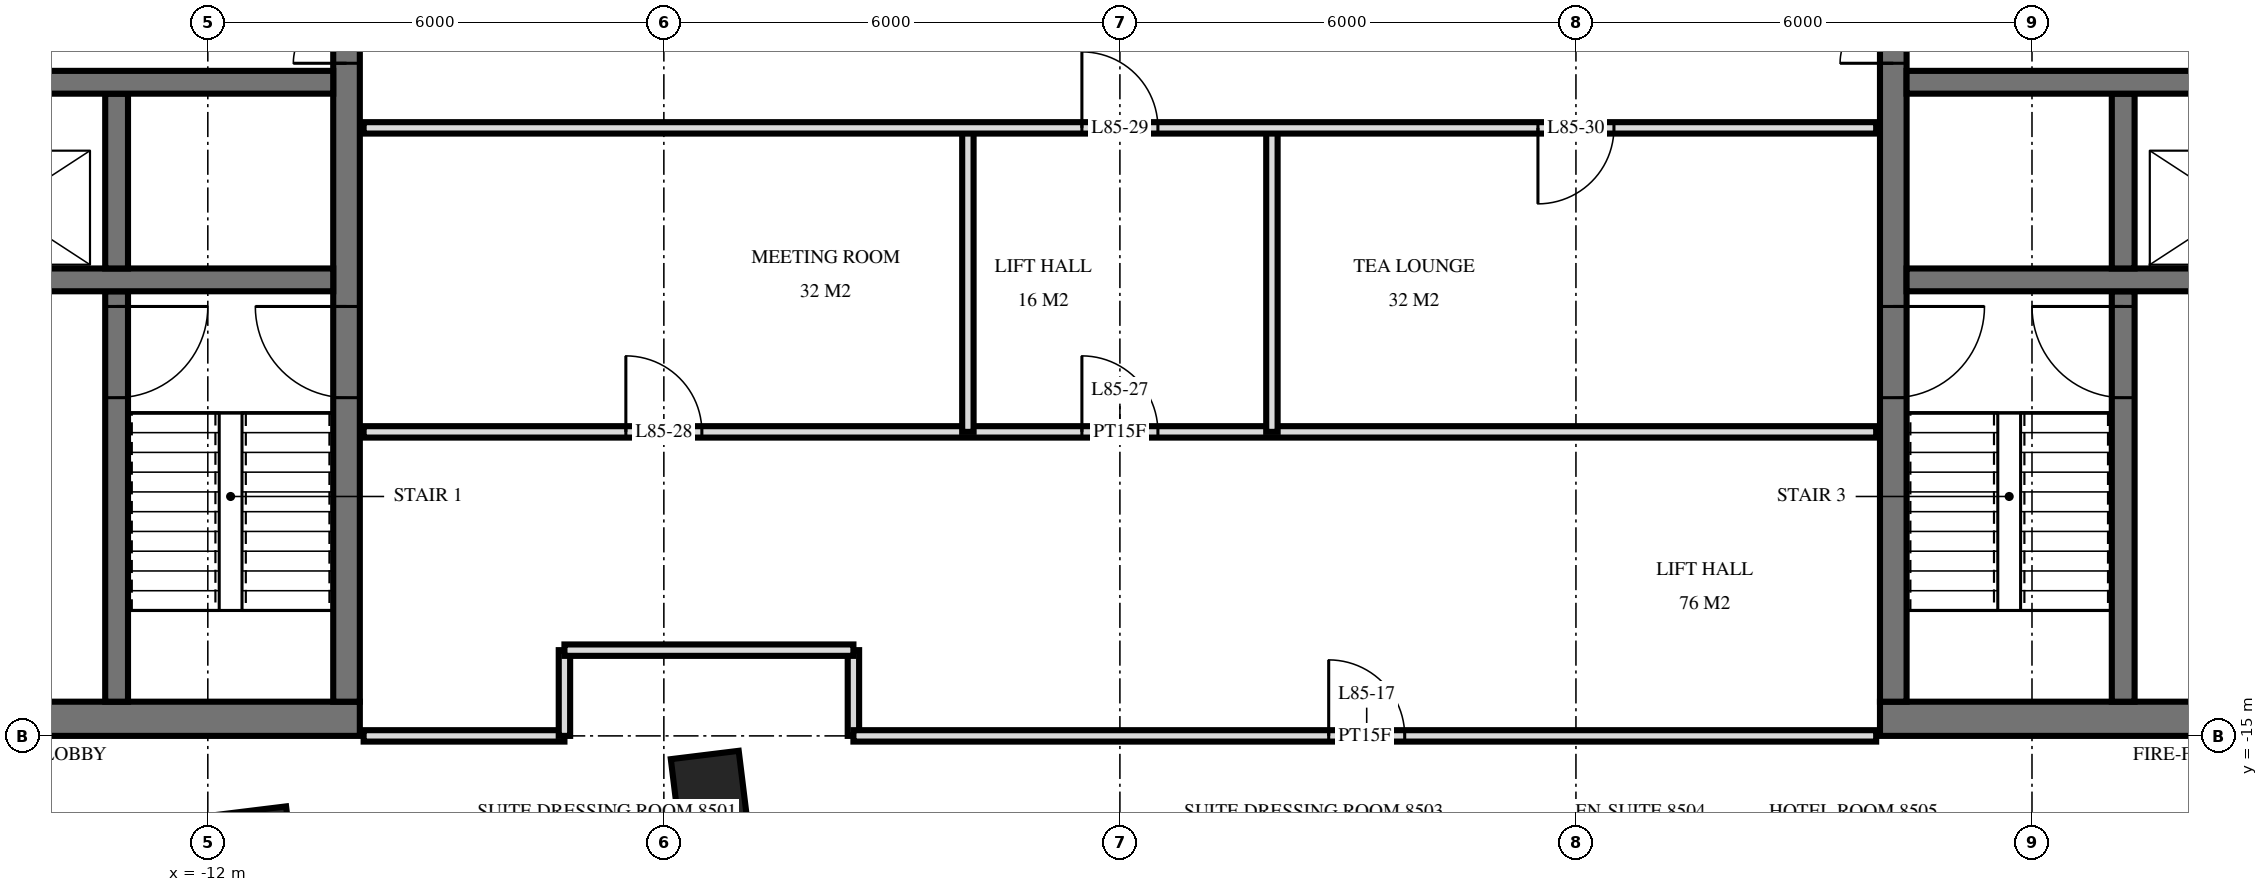
"""IFC4 building model, lengths in metres.
Left out: names, types, materials, properties, quantities, classifications, styles, units other than length and angle.
Written with IfcOpenShell. Run it as: python <this file> out.ifc"""

import sys

from ifc_helpers import new_model, si_unit, direction, frame, frame_2d, origin, origin_2d, place, context, subcontext, project, spatial, rectangle, extrude, element, fill, save


model = new_model("IFC4")
c1 = context("Model", 3, precision=1e-05, world=origin(), true_north=direction((0.0, 1.0)))
c2 = subcontext(c1, "Body", "Model", "MODEL_VIEW")
j1 = project(units=[si_unit("LENGTHUNIT", "METRE"), si_unit("PLANEANGLEUNIT", "RADIAN")], contexts=[c1])
p1 = place(None, origin())
s1 = spatial("IfcSite", under=j1, at=p1, CompositionType="ELEMENT")
p2 = place(p1, origin())
s2 = spatial("IfcBuilding", under=s1, at=p2, CompositionType="ELEMENT")
p3 = place(p2, frame((0.0, 0.0, 322.6)))
s3 = spatial("IfcBuildingStorey", under=s2, at=p3, CompositionType="ELEMENT", Elevation=322.6)
for number, where, z_axis, x_axis in (
    (1, (-11.362, -16.429, 0.0), (0.0, 0.0, 1.0), (0.993, 0.122, 0.0)),
    (2, (-5.407, -15.698, 0.0), (0.0, 0.0, 1.0), (0.993, 0.122, 0.0)),
):
    element("IfcColumn", number, at=place(p3, frame(where, z_axis=z_axis, x_axis=x_axis)), inside=s3, PredefinedType="COLUMN", context=c2, shape_type="SweptSolid", body=[
        extrude(rectangle(XDim=0.9, YDim=0.9, at=origin_2d()), origin(), (0.0, 0.0, 1.0), 4.0),
    ])
p4 = place(p3, frame((-19.5, -14.775, 0.0), z_axis=(0.0, 0.0, 1.0), x_axis=(1.0, 0.0, 0.0)))
e3 = element("IfcWall", 3, at=p4, inside=s3, PredefinedType="SHEAR", context=c2, shape_type="SweptSolid", body=[
    extrude(rectangle(XDim=9.5, YDim=0.45, at=frame_2d((4.75, 0.0))), origin(), (0.0, 0.0, 1.0), 4.0),
])
p5 = place(p4, frame((1.2, 0.0, 0.0)))
e4 = element("IfcOpeningElement", 4, at=p5, cuts=e3, PredefinedType="OPENING", context=c2, shape_type="SweptSolid", body=[
    extrude(rectangle(XDim=1.2, YDim=2.1, at=frame_2d((0.6, 1.05))), frame((0.0, 0.235, 0.0), z_axis=(0.0, -1.0, 0.0), x_axis=(1.0, 0.0, 0.0)), (0.0, 0.0, 1.0), 0.47),
])
p6 = place(p4, frame((4.25, 0.0, 0.0)))
e5 = element("IfcOpeningElement", 5, at=p6, cuts=e3, PredefinedType="OPENING", context=c2, shape_type="SweptSolid", body=[
    extrude(rectangle(XDim=1.1, YDim=2.1, at=frame_2d((0.55, 1.05))), frame((0.0, 0.235, 0.0), z_axis=(0.0, -1.0, 0.0), x_axis=(1.0, 0.0, 0.0)), (0.0, 0.0, 1.0), 0.47),
])
p7 = place(p3, frame((-10.175, -14.55, 0.0), z_axis=(0.0, 0.0, 1.0), x_axis=(0.0, 1.0, 0.0)))
e6 = element("IfcWall", 6, at=p7, inside=s3, PredefinedType="SHEAR", context=c2, shape_type="SweptSolid", body=[
    extrude(rectangle(XDim=14.1, YDim=0.35, at=frame_2d((7.05, 0.0))), origin(), (0.0, 0.0, 1.0), 4.0),
])
p8 = place(p7, frame((8.4, 0.0, 0.0)))
e7 = element("IfcOpeningElement", 7, at=p8, cuts=e6, PredefinedType="OPENING", context=c2, shape_type="SweptSolid", body=[
    extrude(rectangle(XDim=1.4, YDim=2.4, at=frame_2d((0.7, 1.2))), frame((0.0, 0.185, 0.0), z_axis=(0.0, -1.0, 0.0), x_axis=(1.0, 0.0, 0.0)), (0.0, 0.0, 1.0), 0.37),
])
p9 = place(p7, frame((10.0, 0.0, 0.0)))
e8 = element("IfcOpeningElement", 8, at=p9, cuts=e6, PredefinedType="OPENING", context=c2, shape_type="SweptSolid", body=[
    extrude(rectangle(XDim=1.4, YDim=2.4, at=frame_2d((0.7, 1.2))), frame((0.0, 0.185, 0.0), z_axis=(0.0, -1.0, 0.0), x_axis=(1.0, 0.0, 0.0)), (0.0, 0.0, 1.0), 0.37),
])
p10 = place(p7, frame((4.0, 0.0, 0.0)))
e9 = element("IfcOpeningElement", 9, at=p10, cuts=e6, PredefinedType="OPENING", context=c2, shape_type="SweptSolid", body=[
    extrude(rectangle(XDim=1.2, YDim=2.1, at=frame_2d((0.6, 1.05))), frame((0.0, 0.185, 0.0), z_axis=(0.0, -1.0, 0.0), x_axis=(1.0, 0.0, 0.0)), (0.0, 0.0, 1.0), 0.37),
])
p11 = place(p3, frame((-19.05, -6.4, 0.0), z_axis=(0.0, 0.0, 1.0), x_axis=(1.0, 0.0, 0.0)))
e10 = element("IfcWall", 10, at=p11, inside=s3, PredefinedType="SHEAR", context=c2, shape_type="SweptSolid", body=[
    extrude(rectangle(XDim=8.7, YDim=0.3, at=frame_2d((4.35, 0.0))), origin(), (0.0, 0.0, 1.0), 4.0),
])
p12 = place(p11, frame((0.8, 0.0, 0.0)))
e11 = element("IfcOpeningElement", 11, at=p12, cuts=e10, PredefinedType="OPENING", context=c2, shape_type="SweptSolid", body=[
    extrude(rectangle(XDim=1.1, YDim=2.1, at=frame_2d((0.55, 1.05))), frame((0.0, 0.16, 0.0), z_axis=(0.0, -1.0, 0.0), x_axis=(1.0, 0.0, 0.0)), (0.0, 0.0, 1.0), 0.32),
])
p13 = place(p3, frame((-19.05, -9.0, 0.0), z_axis=(0.0, 0.0, 1.0), x_axis=(1.0, 0.0, 0.0)))
e12 = element("IfcWall", 12, at=p13, inside=s3, PredefinedType="SHEAR", context=c2, shape_type="SweptSolid", body=[
    extrude(rectangle(XDim=8.7, YDim=0.3, at=frame_2d((4.35, 0.0))), origin(), (0.0, 0.0, 1.0), 4.0),
])
p14 = place(p13, frame((3.8, 0.0, 0.0)))
e13 = element("IfcOpeningElement", 13, at=p14, cuts=e12, PredefinedType="OPENING", context=c2, shape_type="SweptSolid", body=[
    extrude(rectangle(XDim=1.1, YDim=2.1, at=frame_2d((0.55, 1.05))), frame((0.0, 0.16, 0.0), z_axis=(0.0, -1.0, 0.0), x_axis=(1.0, 0.0, 0.0)), (0.0, 0.0, 1.0), 0.32),
])
p15 = place(p3, frame((-13.2, -8.85, 0.0), z_axis=(0.0, 0.0, 1.0), x_axis=(0.0, 1.0, 0.0)))
e14 = element("IfcWall", 14, at=p15, inside=s3, PredefinedType="SHEAR", context=c2, shape_type="SweptSolid", body=[
    extrude(rectangle(XDim=2.3, YDim=0.3, at=frame_2d((1.15, 0.0))), origin(), (0.0, 0.0, 1.0), 4.0),
])
p16 = place(p3, frame((-13.2, -14.55, 0.0), z_axis=(0.0, 0.0, 1.0), x_axis=(0.0, 1.0, 0.0)))
e15 = element("IfcWall", 15, at=p16, inside=s3, PredefinedType="SHEAR", context=c2, shape_type="SweptSolid", body=[
    extrude(rectangle(XDim=5.4, YDim=0.3, at=frame_2d((2.7, 0.0))), origin(), (0.0, 0.0, 1.0), 4.0),
])
p17 = place(p16, frame((4.0, 0.0, 0.0)))
e16 = element("IfcOpeningElement", 16, at=p17, cuts=e15, PredefinedType="OPENING", context=c2, shape_type="SweptSolid", body=[
    extrude(rectangle(XDim=1.2, YDim=2.1, at=frame_2d((0.6, 1.05))), frame((0.0, 0.16, 0.0), z_axis=(0.0, -1.0, 0.0), x_axis=(1.0, 0.0, 0.0)), (0.0, 0.0, 1.0), 0.32),
])
p18 = place(p3, frame((10.0, -14.775, 0.0), z_axis=(0.0, 0.0, 1.0), x_axis=(1.0, 0.0, 0.0)))
e17 = element("IfcWall", 17, at=p18, inside=s3, PredefinedType="SHEAR", context=c2, shape_type="SweptSolid", body=[
    extrude(rectangle(XDim=9.5, YDim=0.45, at=frame_2d((4.75, 0.0))), origin(), (0.0, 0.0, 1.0), 4.0),
])
p19 = place(p18, frame((7.1, 0.0, 0.0)))
e18 = element("IfcOpeningElement", 18, at=p19, cuts=e17, PredefinedType="OPENING", context=c2, shape_type="SweptSolid", body=[
    extrude(rectangle(XDim=1.2, YDim=2.1, at=frame_2d((0.6, 1.05))), frame((0.0, 0.235, 0.0), z_axis=(0.0, -1.0, 0.0), x_axis=(1.0, 0.0, 0.0)), (0.0, 0.0, 1.0), 0.47),
])
p20 = place(p18, frame((4.15, 0.0, 0.0)))
e19 = element("IfcOpeningElement", 19, at=p20, cuts=e17, PredefinedType="OPENING", context=c2, shape_type="SweptSolid", body=[
    extrude(rectangle(XDim=1.1, YDim=2.1, at=frame_2d((0.55, 1.05))), frame((0.0, 0.235, 0.0), z_axis=(0.0, -1.0, 0.0), x_axis=(1.0, 0.0, 0.0)), (0.0, 0.0, 1.0), 0.47),
])
p21 = place(p3, frame((10.175, -14.55, 0.0), z_axis=(0.0, 0.0, 1.0), x_axis=(0.0, 1.0, 0.0)))
e20 = element("IfcWall", 20, at=p21, inside=s3, PredefinedType="SHEAR", context=c2, shape_type="SweptSolid", body=[
    extrude(rectangle(XDim=14.1, YDim=0.35, at=frame_2d((7.05, 0.0))), origin(), (0.0, 0.0, 1.0), 4.0),
])
p22 = place(p21, frame((8.4, 0.0, 0.0)))
e21 = element("IfcOpeningElement", 21, at=p22, cuts=e20, PredefinedType="OPENING", context=c2, shape_type="SweptSolid", body=[
    extrude(rectangle(XDim=1.4, YDim=2.4, at=frame_2d((0.7, 1.2))), frame((0.0, 0.185, 0.0), z_axis=(0.0, -1.0, 0.0), x_axis=(1.0, 0.0, 0.0)), (0.0, 0.0, 1.0), 0.37),
])
p23 = place(p21, frame((10.0, 0.0, 0.0)))
e22 = element("IfcOpeningElement", 22, at=p23, cuts=e20, PredefinedType="OPENING", context=c2, shape_type="SweptSolid", body=[
    extrude(rectangle(XDim=1.4, YDim=2.4, at=frame_2d((0.7, 1.2))), frame((0.0, 0.185, 0.0), z_axis=(0.0, -1.0, 0.0), x_axis=(1.0, 0.0, 0.0)), (0.0, 0.0, 1.0), 0.37),
])
p24 = place(p21, frame((4.0, 0.0, 0.0)))
e23 = element("IfcOpeningElement", 23, at=p24, cuts=e20, PredefinedType="OPENING", context=c2, shape_type="SweptSolid", body=[
    extrude(rectangle(XDim=1.2, YDim=2.1, at=frame_2d((0.6, 1.05))), frame((0.0, 0.185, 0.0), z_axis=(0.0, -1.0, 0.0), x_axis=(1.0, 0.0, 0.0)), (0.0, 0.0, 1.0), 0.37),
])
p25 = place(p3, frame((10.35, -6.4, 0.0), z_axis=(0.0, 0.0, 1.0), x_axis=(1.0, 0.0, 0.0)))
e24 = element("IfcWall", 24, at=p25, inside=s3, PredefinedType="SHEAR", context=c2, shape_type="SweptSolid", body=[
    extrude(rectangle(XDim=8.7, YDim=0.3, at=frame_2d((4.35, 0.0))), origin(), (0.0, 0.0, 1.0), 4.0),
])
p26 = place(p25, frame((6.8, 0.0, 0.0)))
e25 = element("IfcOpeningElement", 25, at=p26, cuts=e24, PredefinedType="OPENING", context=c2, shape_type="SweptSolid", body=[
    extrude(rectangle(XDim=1.1, YDim=2.1, at=frame_2d((0.55, 1.05))), frame((0.0, 0.16, 0.0), z_axis=(0.0, -1.0, 0.0), x_axis=(1.0, 0.0, 0.0)), (0.0, 0.0, 1.0), 0.32),
])
p27 = place(p3, frame((10.35, -9.0, 0.0), z_axis=(0.0, 0.0, 1.0), x_axis=(1.0, 0.0, 0.0)))
e26 = element("IfcWall", 26, at=p27, inside=s3, PredefinedType="SHEAR", context=c2, shape_type="SweptSolid", body=[
    extrude(rectangle(XDim=8.7, YDim=0.3, at=frame_2d((4.35, 0.0))), origin(), (0.0, 0.0, 1.0), 4.0),
])
p28 = place(p27, frame((3.8, 0.0, 0.0)))
e27 = element("IfcOpeningElement", 27, at=p28, cuts=e26, PredefinedType="OPENING", context=c2, shape_type="SweptSolid", body=[
    extrude(rectangle(XDim=1.1, YDim=2.1, at=frame_2d((0.55, 1.05))), frame((0.0, 0.16, 0.0), z_axis=(0.0, -1.0, 0.0), x_axis=(1.0, 0.0, 0.0)), (0.0, 0.0, 1.0), 0.32),
])
p29 = place(p3, frame((13.2, -8.85, 0.0), z_axis=(0.0, 0.0, 1.0), x_axis=(0.0, 1.0, 0.0)))
e28 = element("IfcWall", 28, at=p29, inside=s3, PredefinedType="SHEAR", context=c2, shape_type="SweptSolid", body=[
    extrude(rectangle(XDim=2.3, YDim=0.3, at=frame_2d((1.15, 0.0))), origin(), (0.0, 0.0, 1.0), 4.0),
])
p30 = place(p3, frame((13.2, -14.55, 0.0), z_axis=(0.0, 0.0, 1.0), x_axis=(0.0, 1.0, 0.0)))
e29 = element("IfcWall", 29, at=p30, inside=s3, PredefinedType="SHEAR", context=c2, shape_type="SweptSolid", body=[
    extrude(rectangle(XDim=5.4, YDim=0.3, at=frame_2d((2.7, 0.0))), origin(), (0.0, 0.0, 1.0), 4.0),
])
p31 = place(p30, frame((4.0, 0.0, 0.0)))
e30 = element("IfcOpeningElement", 30, at=p31, cuts=e29, PredefinedType="OPENING", context=c2, shape_type="SweptSolid", body=[
    extrude(rectangle(XDim=1.2, YDim=2.1, at=frame_2d((0.6, 1.05))), frame((0.0, 0.16, 0.0), z_axis=(0.0, -1.0, 0.0), x_axis=(1.0, 0.0, 0.0)), (0.0, 0.0, 1.0), 0.32),
])
for number, where, z_axis, x_axis in (
    (31, (2.0, -11.0, 0.0), (0.0, 0.0, 1.0), (0.0, 1.0, 0.0)),
    (32, (-2.0, -11.0, 0.0), (0.0, 0.0, 1.0), (0.0, 1.0, 0.0)),
):
    element("IfcWall", number, at=place(p3, frame(where, z_axis=z_axis, x_axis=x_axis)), inside=s3, PredefinedType="PARTITIONING", context=c2, shape_type="SweptSolid", body=[
        extrude(rectangle(XDim=4.0, YDim=0.15, at=frame_2d((2.0, 0.0))), origin(), (0.0, 0.0, 1.0), 3.72),
    ])
for number, where, z_axis, x_axis in (
    (33, (-3.506, -15.0, 0.0), (0.0, 0.0, 1.0), (0.0, 1.0, 0.0)),
    (34, (-7.308, -15.0, 0.0), (0.0, 0.0, 1.0), (0.0, 1.0, 0.0)),
):
    element("IfcWall", number, at=place(p3, frame(where, z_axis=z_axis, x_axis=x_axis)), inside=s3, PredefinedType="PARTITIONING", context=c2, shape_type="SweptSolid", body=[
        extrude(rectangle(XDim=1.128, YDim=0.15, at=frame_2d((0.564, 0.0))), origin(), (0.0, 0.0, 1.0), 3.72),
    ])
p32 = place(p3, frame((-9.95, -15.0, 0.0), z_axis=(0.0, 0.0, 1.0), x_axis=(1.0, 0.0, 0.0)))
e35 = element("IfcWall", 35, at=p32, inside=s3, PredefinedType="PARTITIONING", context=c2, shape_type="SweptSolid", body=[
    extrude(rectangle(XDim=2.642, YDim=0.15, at=frame_2d((1.321, 0.0))), origin(), (0.0, 0.0, 1.0), 3.084),
])
p33 = place(p3, frame((-3.506, -15.0, 0.0), z_axis=(0.0, 0.0, 1.0), x_axis=(1.0, 0.0, 0.0)))
e36 = element("IfcWall", 36, at=p33, inside=s3, PredefinedType="PARTITIONING", context=c2, shape_type="SweptSolid", body=[
    extrude(rectangle(XDim=13.456, YDim=0.15, at=frame_2d((6.728, 0.0))), origin(), (0.0, 0.0, 1.0), 3.084),
])
p34 = place(p33, frame((6.253, 0.0, 0.0)))
e37 = element("IfcOpeningElement", 37, at=p34, cuts=e36, PredefinedType="OPENING", context=c2, shape_type="SweptSolid", body=[
    extrude(rectangle(XDim=1.0, YDim=2.1, at=frame_2d((0.5, 1.05))), frame((0.0, 0.085, 0.0), z_axis=(0.0, -1.0, 0.0), x_axis=(1.0, 0.0, 0.0)), (0.0, 0.0, 1.0), 0.17),
])
p35 = place(p3, frame((-7.308, -13.872, 0.0), z_axis=(0.0, 0.0, 1.0), x_axis=(1.0, 0.0, 0.0)))
e38 = element("IfcWall", 38, at=p35, inside=s3, PredefinedType="PARTITIONING", context=c2, shape_type="SweptSolid", body=[
    extrude(rectangle(XDim=3.802, YDim=0.15, at=frame_2d((1.901, 0.0))), origin(), (0.0, 0.0, 1.0), 3.72),
])
p36 = place(p3, frame((-9.95, -11.0, 0.0), z_axis=(0.0, 0.0, 1.0), x_axis=(1.0, 0.0, 0.0)))
e39 = element("IfcWall", 39, at=p36, inside=s3, PredefinedType="PARTITIONING", context=c2, shape_type="SweptSolid", body=[
    extrude(rectangle(XDim=19.9, YDim=0.15, at=frame_2d((9.95, 0.0))), origin(), (0.0, 0.0, 1.0), 3.72),
])
p37 = place(p36, frame((9.45, 0.0, 0.0)))
e40 = element("IfcOpeningElement", 40, at=p37, cuts=e39, PredefinedType="OPENING", context=c2, shape_type="SweptSolid", body=[
    extrude(rectangle(XDim=1.0, YDim=2.1, at=frame_2d((0.5, 1.05))), frame((0.0, 0.085, 0.0), z_axis=(0.0, -1.0, 0.0), x_axis=(1.0, 0.0, 0.0)), (0.0, 0.0, 1.0), 0.17),
])
p38 = place(p36, frame((3.45, 0.0, 0.0)))
e41 = element("IfcOpeningElement", 41, at=p38, cuts=e39, PredefinedType="OPENING", context=c2, shape_type="SweptSolid", body=[
    extrude(rectangle(XDim=1.0, YDim=2.1, at=frame_2d((0.5, 1.05))), frame((0.0, 0.085, 0.0), z_axis=(0.0, -1.0, 0.0), x_axis=(1.0, 0.0, 0.0)), (0.0, 0.0, 1.0), 0.17),
])
p39 = place(p3, frame((-9.95, -7.0, 0.0), z_axis=(0.0, 0.0, 1.0), x_axis=(1.0, 0.0, 0.0)))
e42 = element("IfcWall", 42, at=p39, inside=s3, PredefinedType="PARTITIONING", context=c2, shape_type="SweptSolid", body=[
    extrude(rectangle(XDim=19.9, YDim=0.15, at=frame_2d((9.95, 0.0))), origin(), (0.0, 0.0, 1.0), 3.72),
])
p40 = place(p39, frame((9.45, 0.0, 0.0)))
e43 = element("IfcOpeningElement", 43, at=p40, cuts=e42, PredefinedType="OPENING", context=c2, shape_type="SweptSolid", body=[
    extrude(rectangle(XDim=1.0, YDim=2.1, at=frame_2d((0.5, 1.05))), frame((0.0, 0.085, 0.0), z_axis=(0.0, -1.0, 0.0), x_axis=(1.0, 0.0, 0.0)), (0.0, 0.0, 1.0), 0.17),
])
p41 = place(p39, frame((15.45, 0.0, 0.0)))
e44 = element("IfcOpeningElement", 44, at=p41, cuts=e42, PredefinedType="OPENING", context=c2, shape_type="SweptSolid", body=[
    extrude(rectangle(XDim=1.0, YDim=2.1, at=frame_2d((0.5, 1.05))), frame((0.0, 0.085, 0.0), z_axis=(0.0, -1.0, 0.0), x_axis=(1.0, 0.0, 0.0)), (0.0, 0.0, 1.0), 0.17),
])
p42 = place(p8, origin())
e45 = element("IfcDoor", 45, at=p42, inside=s3, OperationType="DOUBLE_DOOR_SINGLE_SWING", PredefinedType="DOOR", context=c2, shape_type="SweptSolid", body=[
    extrude(rectangle(XDim=1.4, YDim=2.4, at=frame_2d((0.7, 1.2))), frame((0.0, 0.025, 0.0), z_axis=(0.0, -1.0, 0.0), x_axis=(1.0, 0.0, 0.0)), (0.0, 0.0, 1.0), 0.05),
])
fill(e7, e45)
p43 = place(p10, origin())
e46 = element("IfcDoor", 46, at=p43, inside=s3, OperationType="SINGLE_SWING_LEFT", PredefinedType="DOOR", context=c2, shape_type="SweptSolid", body=[
    extrude(rectangle(XDim=1.2, YDim=2.1, at=frame_2d((0.6, 1.05))), frame((0.0, 0.025, 0.0), z_axis=(0.0, -1.0, 0.0), x_axis=(1.0, 0.0, 0.0)), (0.0, 0.0, 1.0), 0.05),
])
fill(e9, e46)
p44 = place(p17, frame((0.6, 0.0, 0.0), z_axis=(0.0, 0.0, 1.0), x_axis=(-1.0, 0.0, 0.0)))
e47 = element("IfcDoor", 47, at=p44, inside=s3, OperationType="SINGLE_SWING_RIGHT", PredefinedType="DOOR", context=c2, shape_type="SweptSolid", body=[
    extrude(rectangle(XDim=1.2, YDim=2.1, at=frame_2d((0.0, 1.05))), frame((0.0, -0.025, 0.0), z_axis=(0.0, 1.0, 0.0), x_axis=(-1.0, 0.0, 0.0)), (0.0, 0.0, 1.0), 0.05),
])
fill(e16, e47)
p45 = place(p22, origin())
e48 = element("IfcDoor", 48, at=p45, inside=s3, OperationType="DOUBLE_DOOR_SINGLE_SWING", PredefinedType="DOOR", context=c2, shape_type="SweptSolid", body=[
    extrude(rectangle(XDim=1.4, YDim=2.4, at=frame_2d((0.7, 1.2))), frame((0.0, 0.025, 0.0), z_axis=(0.0, -1.0, 0.0), x_axis=(1.0, 0.0, 0.0)), (0.0, 0.0, 1.0), 0.05),
])
fill(e21, e48)
p46 = place(p24, frame((0.6, 0.0, 0.0), z_axis=(0.0, 0.0, 1.0), x_axis=(-1.0, 0.0, 0.0)))
e49 = element("IfcDoor", 49, at=p46, inside=s3, OperationType="SINGLE_SWING_RIGHT", PredefinedType="DOOR", context=c2, shape_type="SweptSolid", body=[
    extrude(rectangle(XDim=1.2, YDim=2.1, at=frame_2d((0.0, 1.05))), frame((0.0, -0.025, 0.0), z_axis=(0.0, 1.0, 0.0), x_axis=(-1.0, 0.0, 0.0)), (0.0, 0.0, 1.0), 0.05),
])
fill(e23, e49)
p47 = place(p31, origin())
e50 = element("IfcDoor", 50, at=p47, inside=s3, OperationType="SINGLE_SWING_LEFT", PredefinedType="DOOR", context=c2, shape_type="SweptSolid", body=[
    extrude(rectangle(XDim=1.2, YDim=2.1, at=frame_2d((0.6, 1.05))), frame((0.0, 0.025, 0.0), z_axis=(0.0, -1.0, 0.0), x_axis=(1.0, 0.0, 0.0)), (0.0, 0.0, 1.0), 0.05),
])
fill(e30, e50)
p48 = place(p34, origin())
e51 = element("IfcDoor", 51, at=p48, inside=s3, OperationType="SINGLE_SWING_RIGHT", PredefinedType="DOOR", context=c2, shape_type="SweptSolid", body=[
    extrude(rectangle(XDim=1.0, YDim=2.1, at=frame_2d((0.5, 1.05))), frame((0.0, 0.025, 0.0), z_axis=(0.0, -1.0, 0.0), x_axis=(1.0, 0.0, 0.0)), (0.0, 0.0, 1.0), 0.05),
])
fill(e37, e51)
p49 = place(p37, origin())
e52 = element("IfcDoor", 52, at=p49, inside=s3, OperationType="SINGLE_SWING_RIGHT", PredefinedType="DOOR", context=c2, shape_type="SweptSolid", body=[
    extrude(rectangle(XDim=1.0, YDim=2.1, at=frame_2d((0.5, 1.05))), frame((0.0, 0.025, 0.0), z_axis=(0.0, -1.0, 0.0), x_axis=(1.0, 0.0, 0.0)), (0.0, 0.0, 1.0), 0.05),
])
fill(e40, e52)
p50 = place(p38, origin())
e53 = element("IfcDoor", 53, at=p50, inside=s3, OperationType="SINGLE_SWING_RIGHT", PredefinedType="DOOR", context=c2, shape_type="SweptSolid", body=[
    extrude(rectangle(XDim=1.0, YDim=2.1, at=frame_2d((0.5, 1.05))), frame((0.0, 0.025, 0.0), z_axis=(0.0, -1.0, 0.0), x_axis=(1.0, 0.0, 0.0)), (0.0, 0.0, 1.0), 0.05),
])
fill(e41, e53)
p51 = place(p40, origin())
e54 = element("IfcDoor", 54, at=p51, inside=s3, OperationType="SINGLE_SWING_RIGHT", PredefinedType="DOOR", context=c2, shape_type="SweptSolid", body=[
    extrude(rectangle(XDim=1.0, YDim=2.1, at=frame_2d((0.5, 1.05))), frame((0.0, 0.025, 0.0), z_axis=(0.0, -1.0, 0.0), x_axis=(1.0, 0.0, 0.0)), (0.0, 0.0, 1.0), 0.05),
])
fill(e43, e54)
p52 = place(p41, frame((0.5, 0.0, 0.0), z_axis=(0.0, 0.0, 1.0), x_axis=(-1.0, 0.0, 0.0)))
e55 = element("IfcDoor", 55, at=p52, inside=s3, OperationType="SINGLE_SWING_LEFT", PredefinedType="DOOR", context=c2, shape_type="SweptSolid", body=[
    extrude(rectangle(XDim=1.0, YDim=2.1, at=frame_2d((0.0, 1.05))), frame((0.0, -0.025, 0.0), z_axis=(0.0, 1.0, 0.0), x_axis=(-1.0, 0.0, 0.0)), (0.0, 0.0, 1.0), 0.05),
])
fill(e44, e55)
save(model, sys.argv[1])
